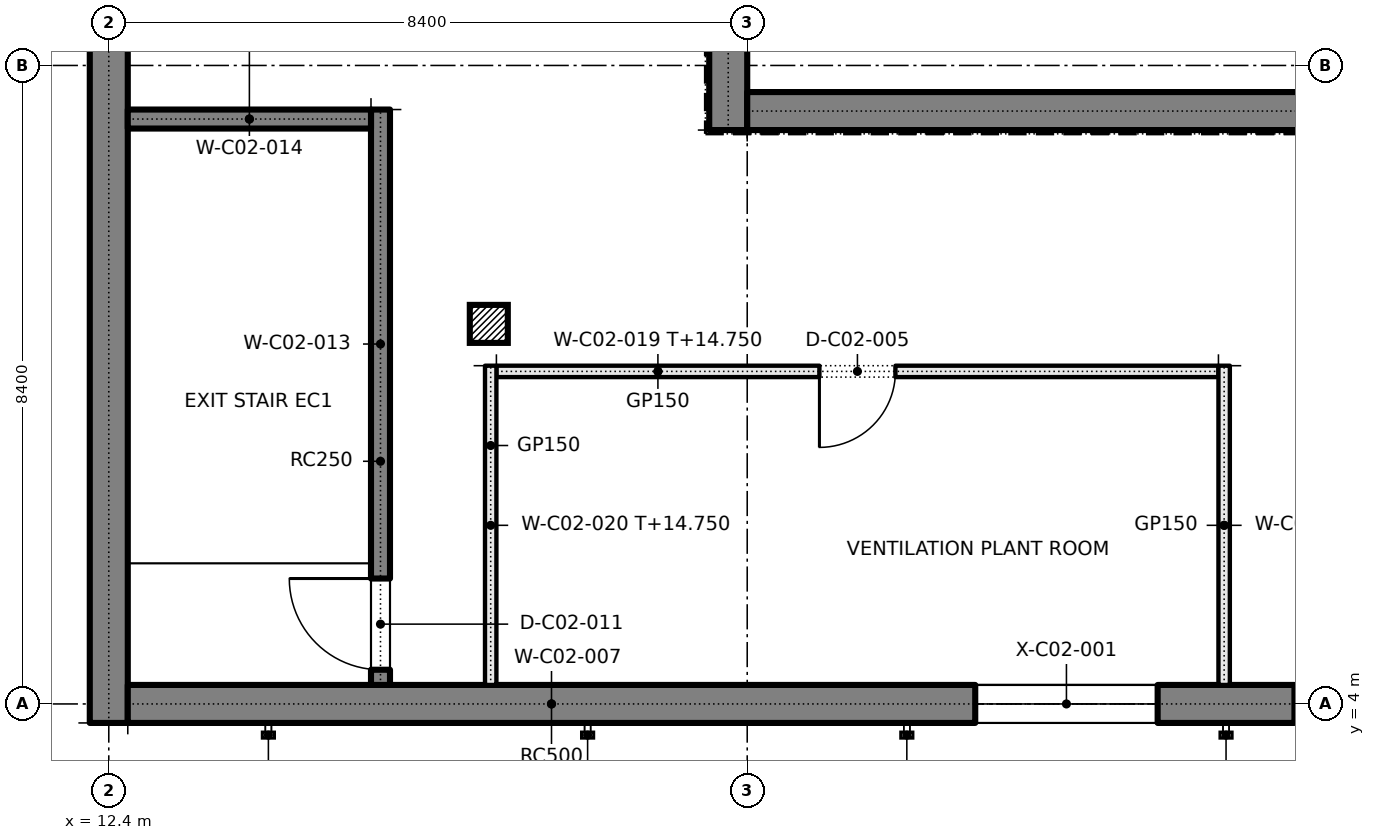
"""IFC4 building model, lengths in metres.
Left out: names, types, materials, properties, quantities, classifications, styles, units other than length and angle.
Written with IfcOpenShell. Run it as: python <this file> out.ifc"""

import sys

from ifc_helpers import new_model, si_unit, direction, frame, frame_2d, origin, origin_2d, place, context, subcontext, project, spatial, rectangle, extrude, element, fill, save


model = new_model("IFC4")
c1 = context("Model", 3, precision=1e-05, world=origin(), true_north=direction((0.0, 1.0)))
c2 = subcontext(c1, "Body", "Model", "MODEL_VIEW")
j1 = project(units=[si_unit("LENGTHUNIT", "METRE"), si_unit("PLANEANGLEUNIT", "RADIAN")], contexts=[c1])
p1 = place(None, origin())
s1 = spatial("IfcSite", under=j1, at=p1, CompositionType="ELEMENT")
p2 = place(p1, origin())
s2 = spatial("IfcBuilding", under=s1, at=p2, CompositionType="ELEMENT")
p3 = place(p2, frame((0.0, 0.0, 10.2)))
s3 = spatial("IfcBuildingStorey", under=s2, at=p3, CompositionType="ELEMENT", Elevation=10.2)
p4 = place(p3, frame((12.4, 3.75, 0.0), z_axis=(0.0, 0.0, 1.0), x_axis=(0.0, 1.0, 0.0)))
e1 = element("IfcWall", 1, at=p4, inside=s3, PredefinedType="SOLIDWALL", context=c2, shape_type="SweptSolid", body=[
    extrude(rectangle(XDim=42.5, YDim=0.5, at=frame_2d((21.25, 0.0))), origin(), (0.0, 0.0, 1.0), 4.8),
])
p5 = place(p3, frame((12.65, 4.0, 0.0), z_axis=(0.0, 0.0, 1.0), x_axis=(1.0, 0.0, 0.0)))
e2 = element("IfcWall", 2, at=p5, inside=s3, PredefinedType="SOLIDWALL", context=c2, shape_type="SweptSolid", body=[
    extrude(rectangle(XDim=33.1, YDim=0.5, at=frame_2d((16.55, 0.0))), origin(), (0.0, 0.0, 1.0), 4.8),
])
p6 = place(p5, frame((11.15, 0.0, 0.9)))
e3 = element("IfcOpeningElement", 3, at=p6, cuts=e2, PredefinedType="OPENING", context=c2, shape_type="SweptSolid", body=[
    extrude(rectangle(XDim=2.4, YDim=2.4, at=frame_2d((1.2, 1.2))), frame((0.0, 0.26, 0.0), z_axis=(0.0, -1.0, 0.0), x_axis=(1.0, 0.0, 0.0)), (0.0, 0.0, 1.0), 0.52),
])
p7 = place(p5, frame((15.35, 0.0, 0.9)))
e4 = element("IfcOpeningElement", 4, at=p7, cuts=e2, PredefinedType="OPENING", context=c2, shape_type="SweptSolid", body=[
    extrude(rectangle(XDim=2.4, YDim=2.4, at=frame_2d((1.2, 1.2))), frame((0.0, 0.26, 0.0), z_axis=(0.0, -1.0, 0.0), x_axis=(1.0, 0.0, 0.0)), (0.0, 0.0, 1.0), 0.52),
])
p8 = place(p5, frame((19.55, 0.0, 0.9)))
e5 = element("IfcOpeningElement", 5, at=p8, cuts=e2, PredefinedType="OPENING", context=c2, shape_type="SweptSolid", body=[
    extrude(rectangle(XDim=2.4, YDim=2.4, at=frame_2d((1.2, 1.2))), frame((0.0, 0.26, 0.0), z_axis=(0.0, -1.0, 0.0), x_axis=(1.0, 0.0, 0.0)), (0.0, 0.0, 1.0), 0.52),
])
p9 = place(p5, frame((23.75, 0.0, 0.9)))
e6 = element("IfcOpeningElement", 6, at=p9, cuts=e2, PredefinedType="OPENING", context=c2, shape_type="SweptSolid", body=[
    extrude(rectangle(XDim=2.4, YDim=2.4, at=frame_2d((1.2, 1.2))), frame((0.0, 0.26, 0.0), z_axis=(0.0, -1.0, 0.0), x_axis=(1.0, 0.0, 0.0)), (0.0, 0.0, 1.0), 0.52),
])
p10 = place(p5, frame((27.95, 0.0, 0.9)))
e7 = element("IfcOpeningElement", 7, at=p10, cuts=e2, PredefinedType="OPENING", context=c2, shape_type="SweptSolid", body=[
    extrude(rectangle(XDim=2.4, YDim=2.4, at=frame_2d((1.2, 1.2))), frame((0.0, 0.26, 0.0), z_axis=(0.0, -1.0, 0.0), x_axis=(1.0, 0.0, 0.0)), (0.0, 0.0, 1.0), 0.52),
])
p11 = place(p3, frame((20.55, 11.55, 0.0), z_axis=(0.0, 0.0, 1.0), x_axis=(0.0, 1.0, 0.0)))
e8 = element("IfcWall", 8, at=p11, inside=s3, PredefinedType="SOLIDWALL", context=c2, shape_type="SweptSolid", body=[
    extrude(rectangle(XDim=29.0, YDim=0.5, at=frame_2d((14.5, 0.0))), origin(), (0.0, 0.0, 1.0), 4.8),
])
p12 = place(p3, frame((20.8, 11.8, 0.0), z_axis=(0.0, 0.0, 1.0), x_axis=(1.0, 0.0, 0.0)))
e9 = element("IfcWall", 9, at=p12, inside=s3, PredefinedType="SOLIDWALL", context=c2, shape_type="SweptSolid", body=[
    extrude(rectangle(XDim=16.8, YDim=0.5, at=frame_2d((8.4, 0.0))), origin(), (0.0, 0.0, 1.0), 4.8),
])
p13 = place(p3, frame((15.975, 4.25, 0.0), z_axis=(0.0, 0.0, 1.0), x_axis=(0.0, 1.0, 0.0)))
e10 = element("IfcWall", 10, at=p13, inside=s3, PredefinedType="SOLIDWALL", context=c2, shape_type="SweptSolid", body=[
    extrude(rectangle(XDim=7.57, YDim=0.25, at=frame_2d((3.785, 0.0))), origin(), (0.0, 0.0, 1.0), 4.8),
])
p14 = place(p13, frame((0.2, 0.0, 0.0)))
e11 = element("IfcOpeningElement", 11, at=p14, cuts=e10, PredefinedType="OPENING", context=c2, shape_type="SweptSolid", body=[
    extrude(rectangle(XDim=1.2, YDim=2.1, at=frame_2d((0.6, 1.05))), frame((0.0, 0.135, 0.0), z_axis=(0.0, -1.0, 0.0), x_axis=(1.0, 0.0, 0.0)), (0.0, 0.0, 1.0), 0.27),
])
p15 = place(p3, frame((12.65, 11.695, 0.0), z_axis=(0.0, 0.0, 1.0), x_axis=(1.0, 0.0, 0.0)))
e12 = element("IfcWall", 12, at=p15, inside=s3, PredefinedType="SOLIDWALL", context=c2, shape_type="SweptSolid", body=[
    extrude(rectangle(XDim=3.2, YDim=0.25, at=frame_2d((1.6, 0.0))), origin(), (0.0, 0.0, 1.0), 4.8),
])
p16 = place(p3, frame((17.4, 9.0, 0.0), z_axis=(0.0, 0.0, 1.0), x_axis=(1.0, 0.0, 0.0)))
e13 = element("IfcColumn", 13, at=p16, inside=s3, PredefinedType="COLUMN", context=c2, shape_type="SweptSolid", body=[
    extrude(rectangle(XDim=0.5, YDim=0.5, at=origin_2d()), origin(), (0.0, 0.0, 1.0), 4.8),
])
p17 = place(p3, frame((17.5, 8.375, 0.0), z_axis=(0.0, 0.0, 1.0), x_axis=(1.0, 0.0, 0.0)))
e14 = element("IfcWall", 14, at=p17, inside=s3, PredefinedType="PARTITIONING", context=c2, shape_type="SweptSolid", body=[
    extrude(rectangle(XDim=9.5, YDim=0.15, at=frame_2d((4.75, 0.0))), origin(), (0.0, 0.0, 1.0), 4.55),
])
p18 = place(p17, frame((4.25, 0.0, 0.0)))
e15 = element("IfcOpeningElement", 15, at=p18, cuts=e14, PredefinedType="OPENING", context=c2, shape_type="SweptSolid", body=[
    extrude(rectangle(XDim=1.0, YDim=2.1, at=frame_2d((0.5, 1.05))), frame((0.0, 0.085, 0.0), z_axis=(0.0, -1.0, 0.0), x_axis=(1.0, 0.0, 0.0)), (0.0, 0.0, 1.0), 0.17),
])
for number, where, z_axis, x_axis in (
    (16, (17.425, 4.25, 0.0), (0.0, 0.0, 1.0), (0.0, 1.0, 0.0)),
    (17, (27.075, 4.25, 0.0), (0.0, 0.0, 1.0), (0.0, 1.0, 0.0)),
):
    element("IfcWall", number, at=place(p3, frame(where, z_axis=z_axis, x_axis=x_axis)), inside=s3, PredefinedType="PARTITIONING", context=c2, shape_type="SweptSolid", body=[
        extrude(rectangle(XDim=4.2, YDim=0.15, at=frame_2d((2.1, 0.0))), origin(), (0.0, 0.0, 1.0), 4.55),
    ])
p19 = place(p6, origin())
e18 = element("IfcWindow", 18, at=p19, inside=s3, PartitioningType="SINGLE_PANEL", PredefinedType="WINDOW", context=c2, shape_type="SweptSolid", body=[
    extrude(rectangle(XDim=2.4, YDim=2.4, at=frame_2d((1.2, 1.2))), frame((0.0, 0.03, 0.0), z_axis=(0.0, -1.0, 0.0), x_axis=(1.0, 0.0, 0.0)), (0.0, 0.0, 1.0), 0.06),
])
fill(e3, e18)
p20 = place(p18, frame((1.0, 0.0, 0.0), z_axis=(0.0, 0.0, 1.0), x_axis=(-1.0, 0.0, 0.0)))
e19 = element("IfcDoor", 19, at=p20, inside=s3, OperationType="SINGLE_SWING_RIGHT", PredefinedType="DOOR", context=c2, shape_type="SweptSolid", body=[
    extrude(rectangle(XDim=1.0, YDim=2.1, at=frame_2d((0.5, 1.05))), frame((0.0, 0.025, 0.0), z_axis=(0.0, -1.0, 0.0), x_axis=(1.0, 0.0, 0.0)), (0.0, 0.0, 1.0), 0.05),
])
fill(e15, e19)
p21 = place(p14, origin())
e20 = element("IfcDoor", 20, at=p21, inside=s3, OperationType="SINGLE_SWING_RIGHT", PredefinedType="DOOR", context=c2, shape_type="SweptSolid", body=[
    extrude(rectangle(XDim=1.2, YDim=2.1, at=frame_2d((0.6, 1.05))), frame((0.0, 0.025, 0.0), z_axis=(0.0, -1.0, 0.0), x_axis=(1.0, 0.0, 0.0)), (0.0, 0.0, 1.0), 0.05),
])
fill(e11, e20)
save(model, sys.argv[1])
